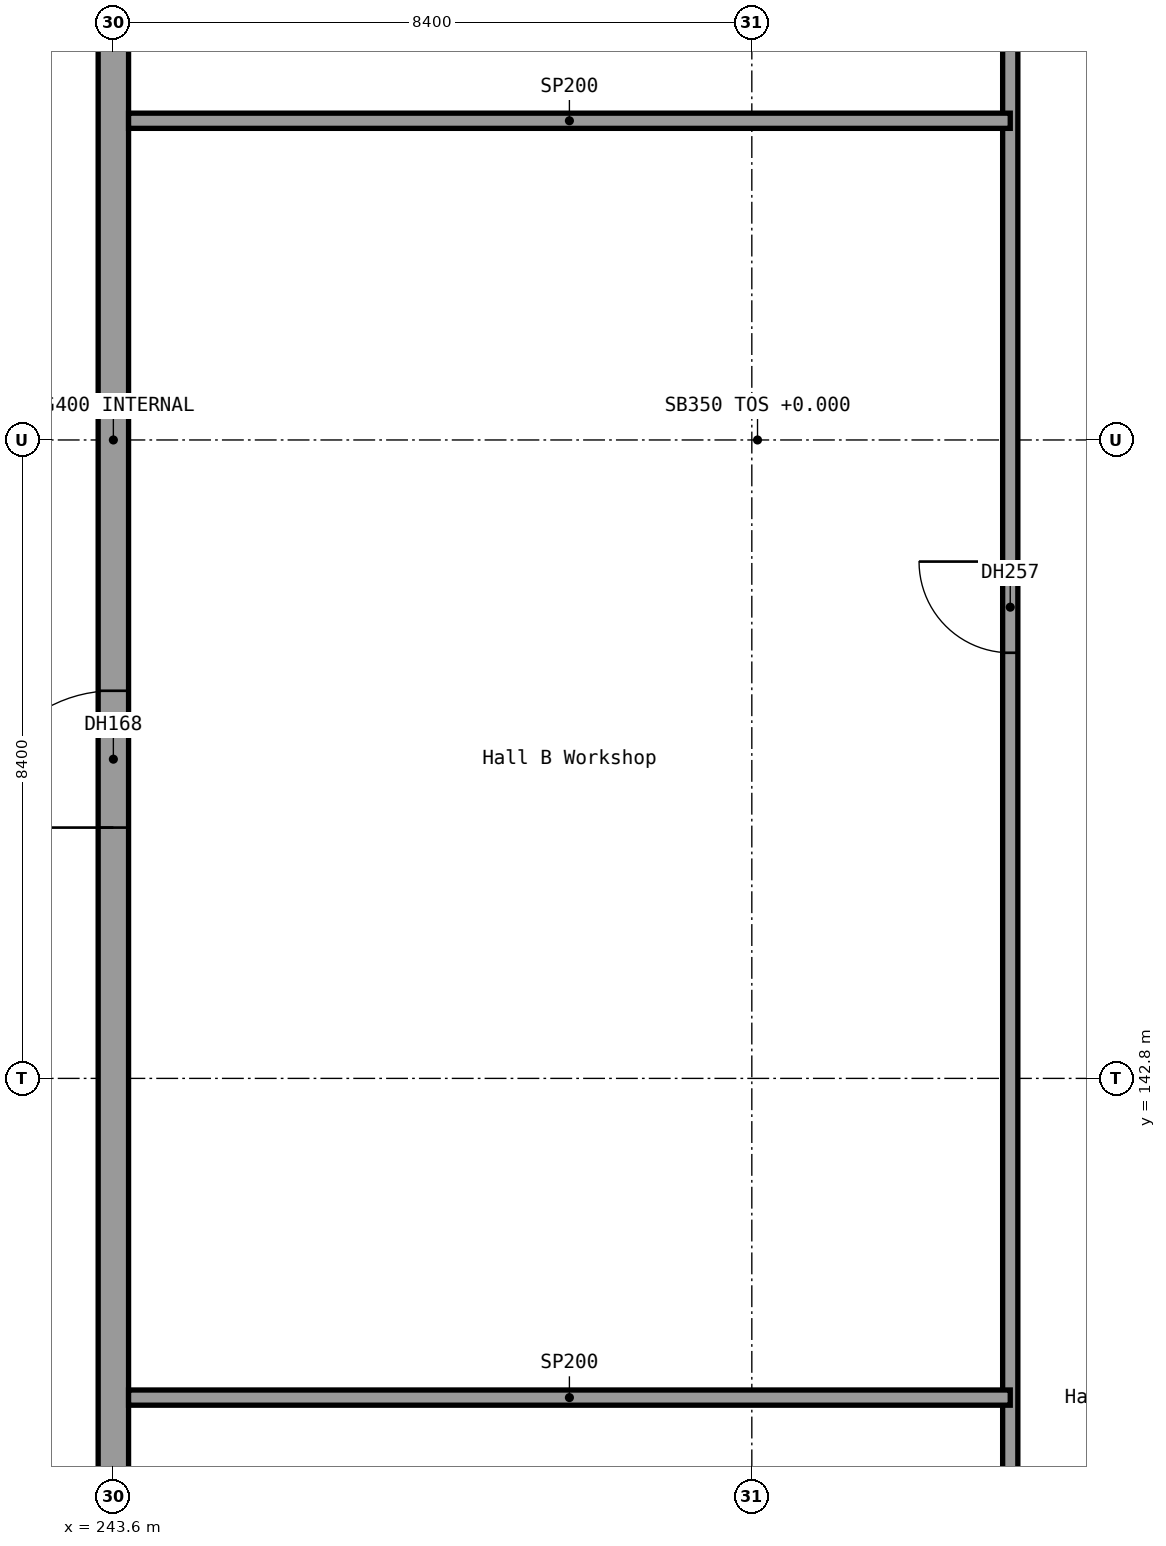
"""IFC4 building model, lengths in metres.
Left out: names, types, materials, properties, quantities, classifications, styles, units other than length and angle.
Written with IfcOpenShell. Run it as: python <this file> out.ifc"""

import sys

from ifc_helpers import new_model, si_unit, direction, frame, frame_2d, origin, origin_2d, place, context, subcontext, project, spatial, rectangle, extrude, element, fill, save


model = new_model("IFC4")
c1 = context("Model", 3, precision=1e-05, world=origin(), true_north=direction((0.0, 1.0)))
c2 = subcontext(c1, "Body", "Model", "MODEL_VIEW")
j1 = project(units=[si_unit("LENGTHUNIT", "METRE"), si_unit("PLANEANGLEUNIT", "RADIAN")], contexts=[c1])
p1 = place(None, origin())
s1 = spatial("IfcSite", under=j1, at=p1, CompositionType="ELEMENT")
p2 = place(p1, origin())
s2 = spatial("IfcBuilding", under=s1, at=p2, CompositionType="ELEMENT")
p3 = place(p2, origin())
s3 = spatial("IfcBuildingStorey", under=s2, at=p3, CompositionType="ELEMENT", Elevation=0.0)
for number, where, z_axis, x_axis in (
    (1, (245.0, 142.8, 0.0), (0.0, 0.0, 1.0), (1.0, 0.0, 0.0)),
    (2, (245.0, 151.2, 0.0), (0.0, 0.0, 1.0), (1.0, 0.0, 0.0)),
    (3, (252.0, 142.8, 0.0), (0.0, 0.0, 1.0), (1.0, 0.0, 0.0)),
    (4, (252.0, 151.2, 0.0), (0.0, 0.0, 1.0), (1.0, 0.0, 0.0)),
):
    element("IfcColumn", number, at=place(p3, frame(where, z_axis=z_axis, x_axis=x_axis)), inside=s3, PredefinedType="COLUMN", context=c2, shape_type="SweptSolid", body=[
        extrude(rectangle(XDim=0.7, YDim=0.7, at=origin_2d()), origin(), (0.0, 0.0, 1.0), 4.8),
    ])
p4 = place(p3, frame((243.6, 101.6, 0.0), z_axis=(0.0, 0.0, 1.0), x_axis=(0.0, 1.0, 0.0)))
e5 = element("IfcWall", 5, at=p4, inside=s3, PredefinedType="SHEAR", context=c2, shape_type="SweptSolid", body=[
    extrude(rectangle(XDim=99.2, YDim=0.4, at=frame_2d((49.6, 0.0))), origin(), (0.0, 0.0, 1.0), 6.0),
])
p5 = place(p4, frame((10.9, 0.0, 0.0)))
e6 = element("IfcOpeningElement", 6, at=p5, cuts=e5, PredefinedType="OPENING", context=c2, shape_type="SweptSolid", body=[
    extrude(rectangle(XDim=1.8, YDim=2.4, at=frame_2d((0.9, 1.2))), frame((0.0, 0.2, 0.0), z_axis=(0.0, -1.0, 0.0), x_axis=(1.0, 0.0, 0.0)), (0.0, 0.0, 1.0), 0.4),
])
p6 = place(p4, frame((27.7, 0.0, 0.0)))
e7 = element("IfcOpeningElement", 7, at=p6, cuts=e5, PredefinedType="OPENING", context=c2, shape_type="SweptSolid", body=[
    extrude(rectangle(XDim=1.8, YDim=2.4, at=frame_2d((0.9, 1.2))), frame((0.0, 0.2, 0.0), z_axis=(0.0, -1.0, 0.0), x_axis=(1.0, 0.0, 0.0)), (0.0, 0.0, 1.0), 0.4),
])
p7 = place(p4, frame((44.5, 0.0, 0.0)))
e8 = element("IfcOpeningElement", 8, at=p7, cuts=e5, PredefinedType="OPENING", context=c2, shape_type="SweptSolid", body=[
    extrude(rectangle(XDim=1.8, YDim=2.4, at=frame_2d((0.9, 1.2))), frame((0.0, 0.2, 0.0), z_axis=(0.0, -1.0, 0.0), x_axis=(1.0, 0.0, 0.0)), (0.0, 0.0, 1.0), 0.4),
])
p8 = place(p4, frame((61.3, 0.0, 0.0)))
e9 = element("IfcOpeningElement", 9, at=p8, cuts=e5, PredefinedType="OPENING", context=c2, shape_type="SweptSolid", body=[
    extrude(rectangle(XDim=1.8, YDim=2.4, at=frame_2d((0.9, 1.2))), frame((0.0, 0.2, 0.0), z_axis=(0.0, -1.0, 0.0), x_axis=(1.0, 0.0, 0.0)), (0.0, 0.0, 1.0), 0.4),
])
p9 = place(p4, frame((78.1, 0.0, 0.0)))
e10 = element("IfcOpeningElement", 10, at=p9, cuts=e5, PredefinedType="OPENING", context=c2, shape_type="SweptSolid", body=[
    extrude(rectangle(XDim=1.8, YDim=2.4, at=frame_2d((0.9, 1.2))), frame((0.0, 0.2, 0.0), z_axis=(0.0, -1.0, 0.0), x_axis=(1.0, 0.0, 0.0)), (0.0, 0.0, 1.0), 0.4),
])
p10 = place(p3, frame((255.4, 100.95, 0.0), z_axis=(0.0, 0.0, 1.0), x_axis=(0.0, 1.0, 0.0)))
e11 = element("IfcWall", 11, at=p10, inside=s3, PredefinedType="PARTITIONING", context=c2, shape_type="SweptSolid", body=[
    extrude(rectangle(XDim=71.25, YDim=0.2, at=frame_2d((35.625, 0.0))), origin(), (0.0, 0.0, 1.0), 4.8),
])
p11 = place(p10, frame((11.825, 0.0, 0.0)))
e12 = element("IfcOpeningElement", 12, at=p11, cuts=e11, PredefinedType="OPENING", context=c2, shape_type="SweptSolid", body=[
    extrude(rectangle(XDim=1.2, YDim=2.1, at=frame_2d((0.6, 1.05))), frame((0.0, 0.1, 0.0), z_axis=(0.0, -1.0, 0.0), x_axis=(1.0, 0.0, 0.0)), (0.0, 0.0, 1.0), 0.2),
])
p12 = place(p10, frame((30.65, 0.0, 0.0)))
e13 = element("IfcOpeningElement", 13, at=p12, cuts=e11, PredefinedType="OPENING", context=c2, shape_type="SweptSolid", body=[
    extrude(rectangle(XDim=1.2, YDim=2.1, at=frame_2d((0.6, 1.05))), frame((0.0, 0.1, 0.0), z_axis=(0.0, -1.0, 0.0), x_axis=(1.0, 0.0, 0.0)), (0.0, 0.0, 1.0), 0.2),
])
p13 = place(p10, frame((47.45, 0.0, 0.0)))
e14 = element("IfcOpeningElement", 14, at=p13, cuts=e11, PredefinedType="OPENING", context=c2, shape_type="SweptSolid", body=[
    extrude(rectangle(XDim=1.2, YDim=2.1, at=frame_2d((0.6, 1.05))), frame((0.0, 0.1, 0.0), z_axis=(0.0, -1.0, 0.0), x_axis=(1.0, 0.0, 0.0)), (0.0, 0.0, 1.0), 0.2),
])
p14 = place(p10, frame((64.25, 0.0, 0.0)))
e15 = element("IfcOpeningElement", 15, at=p14, cuts=e11, PredefinedType="OPENING", context=c2, shape_type="SweptSolid", body=[
    extrude(rectangle(XDim=1.2, YDim=2.1, at=frame_2d((0.6, 1.05))), frame((0.0, 0.1, 0.0), z_axis=(0.0, -1.0, 0.0), x_axis=(1.0, 0.0, 0.0)), (0.0, 0.0, 1.0), 0.2),
])
for number, where, z_axis, x_axis in (
    (16, (243.8, 138.6, 0.0), (0.0, 0.0, 1.0), (1.0, 0.0, 0.0)),
    (17, (243.8, 155.4, 0.0), (0.0, 0.0, 1.0), (1.0, 0.0, 0.0)),
):
    element("IfcWall", number, at=place(p3, frame(where, z_axis=z_axis, x_axis=x_axis)), inside=s3, PredefinedType="PARTITIONING", context=c2, shape_type="SweptSolid", body=[
        extrude(rectangle(XDim=11.6, YDim=0.2, at=frame_2d((5.8, 0.0))), origin(), (0.0, 0.0, 1.0), 4.8),
    ])
p15 = place(p7, origin())
e18 = element("IfcDoor", 18, at=p15, inside=s3, OperationType="DOUBLE_DOOR_SINGLE_SWING", PredefinedType="DOOR", context=c2, shape_type="SweptSolid", body=[
    extrude(rectangle(XDim=1.8, YDim=2.4, at=frame_2d((0.9, 1.2))), frame((0.0, 0.025, 0.0), z_axis=(0.0, -1.0, 0.0), x_axis=(1.0, 0.0, 0.0)), (0.0, 0.0, 1.0), 0.05),
])
fill(e8, e18)
p16 = place(p13, origin())
e19 = element("IfcDoor", 19, at=p16, inside=s3, OperationType="SINGLE_SWING_RIGHT", PredefinedType="DOOR", context=c2, shape_type="SweptSolid", body=[
    extrude(rectangle(XDim=1.2, YDim=2.1, at=frame_2d((0.6, 1.05))), frame((0.0, 0.025, 0.0), z_axis=(0.0, -1.0, 0.0), x_axis=(1.0, 0.0, 0.0)), (0.0, 0.0, 1.0), 0.05),
])
fill(e14, e19)
save(model, sys.argv[1])
